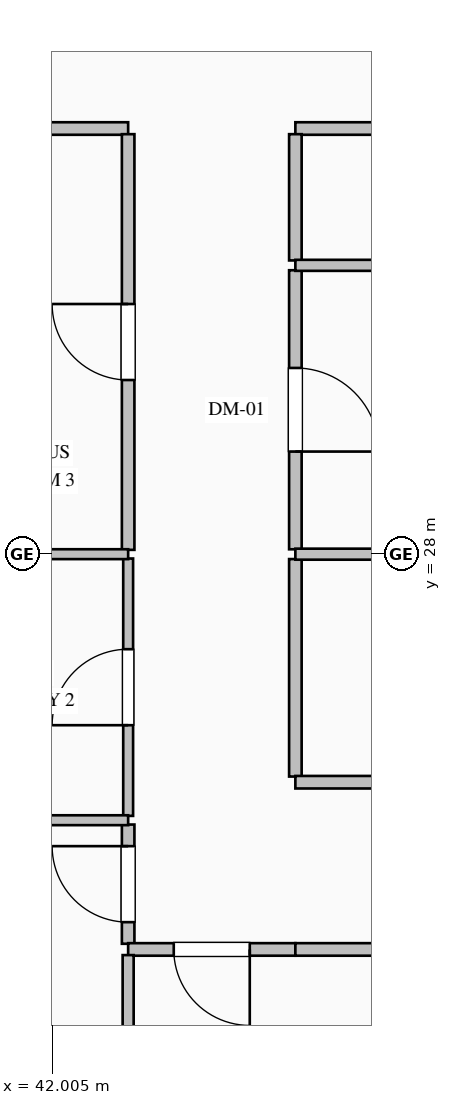
"""IFC4 building model, lengths in metres.
Left out: names, types, materials, properties, quantities, classifications, styles, units other than length and angle.
Written with IfcOpenShell. Run it as: python <this file> out.ifc"""

import sys

from ifc_helpers import new_model, si_unit, direction, frame, frame_2d, origin, place, context, subcontext, project, spatial, rectangle, extrude, element, fill, save


model = new_model("IFC4")
c1 = context("Model", 3, precision=1e-05, world=origin(), true_north=direction((0.0, 1.0)))
c2 = subcontext(c1, "Body", "Model", "MODEL_VIEW")
j1 = project(units=[si_unit("LENGTHUNIT", "METRE"), si_unit("PLANEANGLEUNIT", "RADIAN")], contexts=[c1])
p1 = place(None, origin())
s1 = spatial("IfcSite", under=j1, at=p1, CompositionType="ELEMENT")
p2 = place(p1, origin())
s2 = spatial("IfcBuilding", under=s1, at=p2, CompositionType="ELEMENT")
p3 = place(p2, frame((0.0, 0.0, 299.2)))
s3 = spatial("IfcBuildingStorey", under=s2, at=p3, CompositionType="ELEMENT", Elevation=299.2)
p4 = place(p3, frame((44.627, 18.627, 0.0), z_axis=(0.0, 0.0, 1.0), x_axis=(-0.707106781187, 0.707106781187, 0.0)))
e1 = element("IfcWall", 1, at=p4, inside=s3, PredefinedType="SOLIDWALL", context=c2, shape_type="SweptSolid", body=[
    extrude(rectangle(XDim=5.657, YDim=0.36, at=frame_2d((2.828, 0.0))), origin(), (0.0, 0.0, 1.0), 3.785),
])
p5 = place(p3, frame((56.5, 33.6, 0.0), z_axis=(0.0, 0.0, 1.0), x_axis=(-1.0, 0.0, 0.0)))
e2 = element("IfcWall", 2, at=p5, inside=s3, PredefinedType="PARTITIONING", context=c2, shape_type="SweptSolid", body=[
    extrude(rectangle(XDim=11.3, YDim=0.165, at=frame_2d((5.65, 0.0))), origin(), (0.0, 0.0, 1.0), 3.785),
])
p6 = place(p5, frame((5.15, 0.0, 0.0)))
e3 = element("IfcOpeningElement", 3, at=p6, cuts=e2, PredefinedType="OPENING", context=c2, shape_type="SweptSolid", body=[
    extrude(rectangle(XDim=1.0, YDim=2.15, at=frame_2d((0.5, 1.075))), frame((0.0, 0.093, 0.0), z_axis=(0.0, -1.0, 0.0), x_axis=(1.0, 0.0, 0.0)), (0.0, 0.0, 1.0), 0.185),
])
p7 = place(p3, frame((43.0, 33.6, 0.0), z_axis=(0.0, 0.0, 1.0), x_axis=(-1.0, 0.0, 0.0)))
e4 = element("IfcWall", 4, at=p7, inside=s3, PredefinedType="PARTITIONING", context=c2, shape_type="SweptSolid", body=[
    extrude(rectangle(XDim=2.5, YDim=0.165, at=frame_2d((1.25, 0.0))), origin(), (0.0, 0.0, 1.0), 3.785),
])
p8 = place(p3, frame((45.2, 27.936, 0.0), z_axis=(0.0, 0.0, 1.0), x_axis=(0.0, -1.0, 0.0)))
e5 = element("IfcWall", 5, at=p8, inside=s3, PredefinedType="PARTITIONING", context=c2, shape_type="SweptSolid", body=[
    extrude(rectangle(XDim=2.861, YDim=0.165, at=frame_2d((1.431, 0.0))), origin(), (0.0, 0.0, 1.0), 3.785),
])
p9 = place(p3, frame((45.2, 31.736, 0.0), z_axis=(0.0, 0.0, 1.0), x_axis=(0.0, -1.0, 0.0)))
e6 = element("IfcWall", 6, at=p9, inside=s3, PredefinedType="PARTITIONING", context=c2, shape_type="SweptSolid", body=[
    extrude(rectangle(XDim=3.671, YDim=0.165, at=frame_2d((1.835, 0.0))), origin(), (0.0, 0.0, 1.0), 3.785),
])
p10 = place(p9, frame((1.285, 0.0, 0.0)))
e7 = element("IfcOpeningElement", 7, at=p10, cuts=e6, PredefinedType="OPENING", context=c2, shape_type="SweptSolid", body=[
    extrude(rectangle(XDim=1.1, YDim=2.2, at=frame_2d((0.55, 1.1))), frame((0.0, 0.093, 0.0), z_axis=(0.0, -1.0, 0.0), x_axis=(1.0, 0.0, 0.0)), (0.0, 0.0, 1.0), 0.185),
])
p11 = place(p3, frame((45.2, 33.525, 0.0), z_axis=(0.0, 0.0, 1.0), x_axis=(0.0, -1.0, 0.0)))
e8 = element("IfcWall", 8, at=p11, inside=s3, PredefinedType="PARTITIONING", context=c2, shape_type="SweptSolid", body=[
    extrude(rectangle(XDim=1.661, YDim=0.165, at=frame_2d((0.831, 0.0))), origin(), (0.0, 0.0, 1.0), 3.785),
])
p12 = place(p3, frame((43.0, 22.875, 0.0), z_axis=(0.0, 0.0, 1.0), x_axis=(0.0, 1.0, 0.0)))
e9 = element("IfcWall", 9, at=p12, inside=s3, PredefinedType="PARTITIONING", context=c2, shape_type="SweptSolid", body=[
    extrude(rectangle(XDim=1.569, YDim=0.165, at=frame_2d((0.784, 0.0))), origin(), (0.0, 0.0, 1.0), 3.785),
])
p13 = place(p12, frame((0.284, 0.0, 0.0)))
e10 = element("IfcOpeningElement", 10, at=p13, cuts=e9, PredefinedType="OPENING", context=c2, shape_type="SweptSolid", body=[
    extrude(rectangle(XDim=1.0, YDim=2.15, at=frame_2d((0.5, 1.075))), frame((0.0, 0.093, 0.0), z_axis=(0.0, -1.0, 0.0), x_axis=(1.0, 0.0, 0.0)), (0.0, 0.0, 1.0), 0.185),
])
p14 = place(p3, frame((43.0, 24.557, 0.0), z_axis=(0.0, 0.0, 1.0), x_axis=(0.0, 1.0, 0.0)))
e11 = element("IfcWall", 11, at=p14, inside=s3, PredefinedType="PARTITIONING", context=c2, shape_type="SweptSolid", body=[
    extrude(rectangle(XDim=3.386, YDim=0.13, at=frame_2d((1.693, 0.0))), origin(), (0.0, 0.0, 1.0), 3.785),
])
p15 = place(p14, frame((1.193, 0.0, 0.0)))
e12 = element("IfcOpeningElement", 12, at=p15, cuts=e11, PredefinedType="OPENING", context=c2, shape_type="SweptSolid", body=[
    extrude(rectangle(XDim=1.0, YDim=2.15, at=frame_2d((0.5, 1.075))), frame((0.0, 0.075, 0.0), z_axis=(0.0, -1.0, 0.0), x_axis=(1.0, 0.0, 0.0)), (0.0, 0.0, 1.0), 0.15),
])
p16 = place(p3, frame((43.0, 28.057, 0.0), z_axis=(0.0, 0.0, 1.0), x_axis=(0.0, 1.0, 0.0)))
e13 = element("IfcWall", 13, at=p16, inside=s3, PredefinedType="PARTITIONING", context=c2, shape_type="SweptSolid", body=[
    extrude(rectangle(XDim=5.469, YDim=0.165, at=frame_2d((2.734, 0.0))), origin(), (0.0, 0.0, 1.0), 3.785),
])
p17 = place(p16, frame((2.234, 0.0, 0.0)))
e14 = element("IfcOpeningElement", 14, at=p17, cuts=e13, PredefinedType="OPENING", context=c2, shape_type="SweptSolid", body=[
    extrude(rectangle(XDim=1.0, YDim=2.15, at=frame_2d((0.5, 1.075))), frame((0.0, 0.093, 0.0), z_axis=(0.0, -1.0, 0.0), x_axis=(1.0, 0.0, 0.0)), (0.0, 0.0, 1.0), 0.185),
])
p18 = place(p3, frame((45.2, 22.8, 0.0), z_axis=(0.0, 0.0, 1.0), x_axis=(-1.0, 0.0, 0.0)))
e15 = element("IfcWall", 15, at=p18, inside=s3, PredefinedType="PARTITIONING", context=c2, shape_type="SweptSolid", body=[
    extrude(rectangle(XDim=2.2, YDim=0.165, at=frame_2d((1.1, 0.0))), origin(), (0.0, 0.0, 1.0), 3.785),
])
p19 = place(p18, frame((0.6, 0.0, 0.0)))
e16 = element("IfcOpeningElement", 16, at=p19, cuts=e15, PredefinedType="OPENING", context=c2, shape_type="SweptSolid", body=[
    extrude(rectangle(XDim=1.0, YDim=2.15, at=frame_2d((0.5, 1.075))), frame((0.0, 0.093, 0.0), z_axis=(0.0, -1.0, 0.0), x_axis=(1.0, 0.0, 0.0)), (0.0, 0.0, 1.0), 0.185),
])
p20 = place(p3, frame((45.2, 25.0, 0.0), z_axis=(0.0, 0.0, 1.0), x_axis=(1.0, 0.0, 0.0)))
e17 = element("IfcWall", 17, at=p20, inside=s3, PredefinedType="PARTITIONING", context=c2, shape_type="SweptSolid", body=[
    extrude(rectangle(XDim=16.3, YDim=0.165, at=frame_2d((8.15, 0.0))), origin(), (0.0, 0.0, 1.0), 3.785),
])
p21 = place(p20, frame((7.65, 0.0, 0.0)))
e18 = element("IfcOpeningElement", 18, at=p21, cuts=e17, PredefinedType="OPENING", context=c2, shape_type="SweptSolid", body=[
    extrude(rectangle(XDim=1.0, YDim=2.15, at=frame_2d((0.5, 1.075))), frame((0.0, 0.093, 0.0), z_axis=(0.0, -1.0, 0.0), x_axis=(1.0, 0.0, 0.0)), (0.0, 0.0, 1.0), 0.185),
])
p22 = place(p3, frame((46.5, 22.8, 0.0), z_axis=(0.0, 0.0, 1.0), x_axis=(-1.0, 0.0, 0.0)))
e19 = element("IfcWall", 19, at=p22, inside=s3, PredefinedType="PARTITIONING", context=c2, shape_type="SweptSolid", body=[
    extrude(rectangle(XDim=1.3, YDim=0.165, at=frame_2d((0.65, 0.0))), origin(), (0.0, 0.0, 1.0), 3.785),
])
p23 = place(p3, frame((45.2, 28.0, 0.0), z_axis=(0.0, 0.0, 1.0), x_axis=(1.0, 0.0, 0.0)))
e20 = element("IfcWall", 20, at=p23, inside=s3, PredefinedType="PARTITIONING", context=c2, shape_type="SweptSolid", body=[
    extrude(rectangle(XDim=18.518, YDim=0.145, at=frame_2d((9.259, 0.0))), origin(), (0.0, 0.0, 1.0), 3.177),
])
p24 = place(p3, frame((45.2, 31.8, 0.0), z_axis=(0.0, 0.0, 1.0), x_axis=(1.0, 0.0, 0.0)))
e21 = element("IfcWall", 21, at=p24, inside=s3, PredefinedType="PARTITIONING", context=c2, shape_type="SweptSolid", body=[
    extrude(rectangle(XDim=18.518, YDim=0.145, at=frame_2d((9.259, 0.0))), origin(), (0.0, 0.0, 1.0), 3.785),
])
p25 = place(p3, frame((40.852, 24.5, 0.0), z_axis=(0.0, 0.0, 1.0), x_axis=(1.0, 0.0, 0.0)))
e22 = element("IfcWall", 22, at=p25, inside=s3, PredefinedType="PARTITIONING", context=c2, shape_type="SweptSolid", body=[
    extrude(rectangle(XDim=2.148, YDim=0.13, at=frame_2d((1.074, 0.0))), origin(), (0.0, 0.0, 1.0), 3.785),
])
p26 = place(p3, frame((43.0, 22.726, 0.0), z_axis=(0.0, 0.0, 1.0), x_axis=(0.0, -1.0, 0.0)))
e23 = element("IfcWall", 23, at=p26, inside=s3, PredefinedType="PARTITIONING", context=c2, shape_type="SweptSolid", body=[
    extrude(rectangle(XDim=2.228, YDim=0.145, at=frame_2d((1.114, 0.0))), origin(), (0.0, 0.0, 1.0), 3.785),
])
p27 = place(p3, frame((40.852, 28.0, 0.0), z_axis=(0.0, 0.0, 1.0), x_axis=(1.0, 0.0, 0.0)))
e24 = element("IfcWall", 24, at=p27, inside=s3, PredefinedType="PARTITIONING", context=c2, shape_type="SweptSolid", body=[
    extrude(rectangle(XDim=2.148, YDim=0.13, at=frame_2d((1.074, 0.0))), origin(), (0.0, 0.0, 1.0), 3.177),
])
p28 = place(p10, origin())
e25 = element("IfcDoor", 25, at=p28, inside=s3, OperationType="SINGLE_SWING_RIGHT", PredefinedType="DOOR", context=c2, shape_type="SweptSolid", body=[
    extrude(rectangle(XDim=1.1, YDim=2.2, at=frame_2d((0.55, 1.1))), frame((0.0, 0.025, 0.0), z_axis=(0.0, -1.0, 0.0), x_axis=(1.0, 0.0, 0.0)), (0.0, 0.0, 1.0), 0.05),
])
fill(e7, e25)
p29 = place(p13, origin())
e26 = element("IfcDoor", 26, at=p29, inside=s3, OperationType="SINGLE_SWING_RIGHT", PredefinedType="DOOR", context=c2, shape_type="SweptSolid", body=[
    extrude(rectangle(XDim=1.0, YDim=2.15, at=frame_2d((0.5, 1.075))), frame((0.0, 0.025, 0.0), z_axis=(0.0, -1.0, 0.0), x_axis=(1.0, 0.0, 0.0)), (0.0, 0.0, 1.0), 0.05),
])
fill(e10, e26)
p30 = place(p15, origin())
e27 = element("IfcDoor", 27, at=p30, inside=s3, OperationType="SINGLE_SWING_LEFT", PredefinedType="DOOR", context=c2, shape_type="SweptSolid", body=[
    extrude(rectangle(XDim=1.0, YDim=2.15, at=frame_2d((0.5, 1.075))), frame((0.0, 0.025, 0.0), z_axis=(0.0, -1.0, 0.0), x_axis=(1.0, 0.0, 0.0)), (0.0, 0.0, 1.0), 0.05),
])
fill(e12, e27)
p31 = place(p17, origin())
e28 = element("IfcDoor", 28, at=p31, inside=s3, OperationType="SINGLE_SWING_RIGHT", PredefinedType="DOOR", context=c2, shape_type="SweptSolid", body=[
    extrude(rectangle(XDim=1.0, YDim=2.15, at=frame_2d((0.5, 1.075))), frame((0.0, 0.025, 0.0), z_axis=(0.0, -1.0, 0.0), x_axis=(1.0, 0.0, 0.0)), (0.0, 0.0, 1.0), 0.05),
])
fill(e14, e28)
p32 = place(p19, origin())
e29 = element("IfcDoor", 29, at=p32, inside=s3, OperationType="SINGLE_SWING_LEFT", PredefinedType="DOOR", context=c2, shape_type="SweptSolid", body=[
    extrude(rectangle(XDim=1.0, YDim=2.15, at=frame_2d((0.5, 1.075))), frame((0.0, 0.025, 0.0), z_axis=(0.0, -1.0, 0.0), x_axis=(1.0, 0.0, 0.0)), (0.0, 0.0, 1.0), 0.05),
])
fill(e16, e29)
save(model, sys.argv[1])
